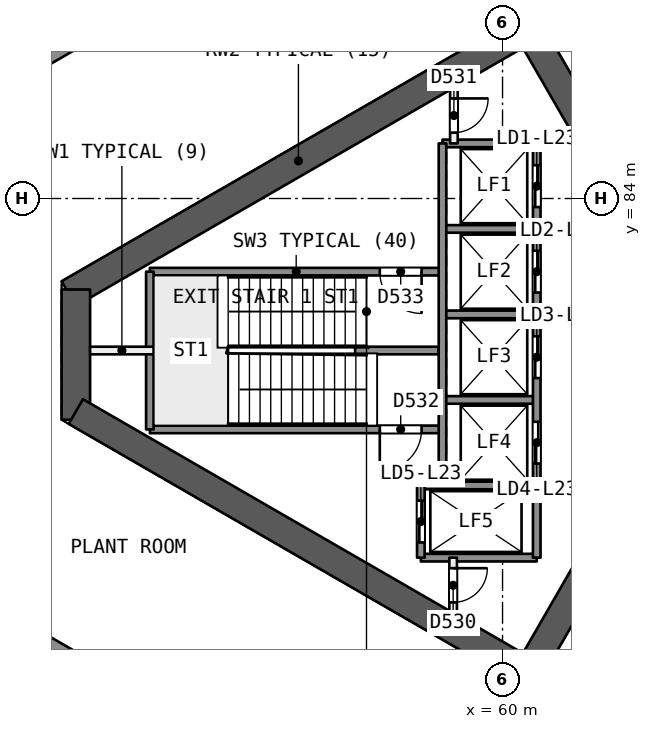
"""IFC4 building model, lengths in metres.
Left out: names, types, materials, properties, quantities, classifications, styles, units other than length and angle.
Written with IfcOpenShell. Run it as: python <this file> out.ifc"""

import sys

from ifc_helpers import new_model, si_unit, direction, frame, frame_2d, origin, place, context, subcontext, project, spatial, rectangle, extrude, element, fill, save


model = new_model("IFC4")
c1 = context("Model", 3, precision=1e-05, world=origin(), true_north=direction((0.0, 1.0)))
c2 = subcontext(c1, "Body", "Model", "MODEL_VIEW")
j1 = project(units=[si_unit("LENGTHUNIT", "METRE"), si_unit("PLANEANGLEUNIT", "RADIAN")], contexts=[c1])
p1 = place(None, origin())
s1 = spatial("IfcSite", under=j1, at=p1, CompositionType="ELEMENT")
p2 = place(p1, origin())
s2 = spatial("IfcBuilding", under=s1, at=p2, CompositionType="ELEMENT")
p3 = place(p2, frame((0.0, 0.0, 98.0)))
s3 = spatial("IfcBuildingStorey", under=s2, at=p3, CompositionType="ELEMENT", Elevation=98.0)
p4 = place(p3, frame((65.567, 80.0, 0.0), z_axis=(0.0, 0.0, 1.0), x_axis=(-0.499988615364, 0.866031976607, 0.0)))
e1 = element("IfcWall", 1, at=p4, inside=s3, PredefinedType="SHEAR", context=c2, shape_type="SweptSolid", body=[
    extrude(rectangle(XDim=10.163, YDim=0.75, at=frame_2d((5.082, 0.0))), origin(), (0.0, 0.0, 1.0), 4.4),
])
p5 = place(p4, frame((0.733, 0.0, 0.0)))
e2 = element("IfcOpeningElement", 2, at=p5, cuts=e1, PredefinedType="OPENING", context=c2, shape_type="SweptSolid", body=[
    extrude(rectangle(XDim=1.2, YDim=2.1, at=frame_2d((0.6, 1.05))), frame((0.0, 0.385, 0.0), z_axis=(0.0, -1.0, 0.0), x_axis=(1.0, 0.0, 0.0)), (0.0, 0.0, 1.0), 0.771),
])
p6 = place(p3, frame((60.673, 88.477, 0.0), z_axis=(0.0, 0.0, 1.0), x_axis=(-0.8660248072, -0.500001033313, 0.0)))
e3 = element("IfcWall", 3, at=p6, inside=s3, PredefinedType="SHEAR", context=c2, shape_type="SweptSolid", body=[
    extrude(rectangle(XDim=13.958, YDim=0.75, at=frame_2d((6.979, 0.0))), origin(), (0.0, 0.0, 1.0), 4.4),
])
p7 = place(p3, frame((48.772, 81.606, 0.0), z_axis=(0.0, 0.0, 1.0), x_axis=(0.0, -1.0, 0.0)))
e4 = element("IfcWall", 4, at=p7, inside=s3, PredefinedType="SHEAR", context=c2, shape_type="SweptSolid", body=[
    extrude(rectangle(XDim=3.429, YDim=0.75, at=frame_2d((1.714, 0.0))), origin(), (0.0, 0.0, 1.0), 4.4),
])
p8 = place(p3, frame((48.772, 78.394, 0.0), z_axis=(0.0, 0.0, 1.0), x_axis=(0.866028339916, -0.499994914436, 0.0)))
e5 = element("IfcWall", 5, at=p8, inside=s3, PredefinedType="SHEAR", context=c2, shape_type="SweptSolid", body=[
    extrude(rectangle(XDim=14.117, YDim=0.75, at=frame_2d((7.059, 0.0))), origin(), (0.0, 0.0, 1.0), 4.4),
])
p9 = place(p3, frame((60.673, 71.523, 0.0), z_axis=(0.0, 0.0, 1.0), x_axis=(0.499997052475, 0.866027105532, 0.0)))
e6 = element("IfcWall", 6, at=p9, inside=s3, PredefinedType="SHEAR", context=c2, shape_type="SweptSolid", body=[
    extrude(rectangle(XDim=10.005, YDim=0.75, at=frame_2d((5.002, 0.0))), origin(), (0.0, 0.0, 1.0), 4.4),
])
p10 = place(p9, frame((7.855, 0.0, 0.0)))
e7 = element("IfcOpeningElement", 7, at=p10, cuts=e6, PredefinedType="OPENING", context=c2, shape_type="SweptSolid", body=[
    extrude(rectangle(XDim=1.2, YDim=2.1, at=frame_2d((0.6, 1.05))), frame((0.0, 0.385, 0.0), z_axis=(0.0, -1.0, 0.0), x_axis=(1.0, 0.0, 0.0)), (0.0, 0.0, 1.0), 0.771),
])
p11 = place(p3, frame((39.875, 82.961, 0.0), z_axis=(0.0, 0.0, 1.0), x_axis=(0.866025498246, 0.499999836387, 0.0)))
e8 = element("IfcWall", 8, at=p11, inside=s3, PredefinedType="SOLIDWALL", context=c2, shape_type="SweptSolid", body=[
    extrude(rectangle(XDim=57.878, YDim=0.3, at=frame_2d((28.939, 0.0))), origin(), (0.0, 0.0, 1.0), 3.9),
])
p12 = place(p11, frame((3.323, 0.0, 0.6)))
e9 = element("IfcOpeningElement", 9, at=p12, cuts=e8, PredefinedType="OPENING", context=c2, shape_type="SweptSolid", body=[
    extrude(rectangle(XDim=3.0, YDim=2.4, at=frame_2d((1.5, 1.2))), frame((0.0, 0.161, 0.0), z_axis=(0.0, -1.0, 0.0), x_axis=(1.0, 0.0, 0.0)), (0.0, 0.0, 1.0), 0.321),
])
p13 = place(p11, frame((12.969, 0.0, 0.6)))
e10 = element("IfcOpeningElement", 10, at=p13, cuts=e8, PredefinedType="OPENING", context=c2, shape_type="SweptSolid", body=[
    extrude(rectangle(XDim=3.0, YDim=2.4, at=frame_2d((1.5, 1.2))), frame((0.0, 0.161, 0.0), z_axis=(0.0, -1.0, 0.0), x_axis=(1.0, 0.0, 0.0)), (0.0, 0.0, 1.0), 0.321),
])
p14 = place(p11, frame((22.616, 0.0, 0.6)))
e11 = element("IfcOpeningElement", 11, at=p14, cuts=e8, PredefinedType="OPENING", context=c2, shape_type="SweptSolid", body=[
    extrude(rectangle(XDim=3.0, YDim=2.4, at=frame_2d((1.5, 1.2))), frame((0.0, 0.161, 0.0), z_axis=(0.0, -1.0, 0.0), x_axis=(1.0, 0.0, 0.0)), (0.0, 0.0, 1.0), 0.321),
])
p15 = place(p11, frame((32.262, 0.0, 0.6)))
e12 = element("IfcOpeningElement", 12, at=p15, cuts=e8, PredefinedType="OPENING", context=c2, shape_type="SweptSolid", body=[
    extrude(rectangle(XDim=3.0, YDim=2.4, at=frame_2d((1.5, 1.2))), frame((0.0, 0.161, 0.0), z_axis=(0.0, -1.0, 0.0), x_axis=(1.0, 0.0, 0.0)), (0.0, 0.0, 1.0), 0.321),
])
p16 = place(p11, frame((41.908, 0.0, 0.6)))
e13 = element("IfcOpeningElement", 13, at=p16, cuts=e8, PredefinedType="OPENING", context=c2, shape_type="SweptSolid", body=[
    extrude(rectangle(XDim=3.0, YDim=2.4, at=frame_2d((1.5, 1.2))), frame((0.0, 0.161, 0.0), z_axis=(0.0, -1.0, 0.0), x_axis=(1.0, 0.0, 0.0)), (0.0, 0.0, 1.0), 0.321),
])
p17 = place(p11, frame((51.555, 0.0, 0.6)))
e14 = element("IfcOpeningElement", 14, at=p17, cuts=e8, PredefinedType="OPENING", context=c2, shape_type="SweptSolid", body=[
    extrude(rectangle(XDim=3.0, YDim=2.4, at=frame_2d((1.5, 1.2))), frame((0.0, 0.161, 0.0), z_axis=(0.0, -1.0, 0.0), x_axis=(1.0, 0.0, 0.0)), (0.0, 0.0, 1.0), 0.321),
])
p18 = place(p3, frame((89.998, 48.1, 0.0), z_axis=(0.0, 0.0, 1.0), x_axis=(-0.866025498246, 0.499999836387, 0.0)))
e15 = element("IfcWall", 15, at=p18, inside=s3, PredefinedType="SOLIDWALL", context=c2, shape_type="SweptSolid", body=[
    extrude(rectangle(XDim=57.878, YDim=0.3, at=frame_2d((28.939, 0.0))), origin(), (0.0, 0.0, 1.0), 3.9),
])
p19 = place(p18, frame((3.323, 0.0, 0.6)))
e16 = element("IfcOpeningElement", 16, at=p19, cuts=e15, PredefinedType="OPENING", context=c2, shape_type="SweptSolid", body=[
    extrude(rectangle(XDim=3.0, YDim=2.4, at=frame_2d((1.5, 1.2))), frame((0.0, 0.161, 0.0), z_axis=(0.0, -1.0, 0.0), x_axis=(1.0, 0.0, 0.0)), (0.0, 0.0, 1.0), 0.321),
])
p20 = place(p18, frame((12.969, 0.0, 0.6)))
e17 = element("IfcOpeningElement", 17, at=p20, cuts=e15, PredefinedType="OPENING", context=c2, shape_type="SweptSolid", body=[
    extrude(rectangle(XDim=3.0, YDim=2.4, at=frame_2d((1.5, 1.2))), frame((0.0, 0.161, 0.0), z_axis=(0.0, -1.0, 0.0), x_axis=(1.0, 0.0, 0.0)), (0.0, 0.0, 1.0), 0.321),
])
p21 = place(p18, frame((22.616, 0.0, 0.6)))
e18 = element("IfcOpeningElement", 18, at=p21, cuts=e15, PredefinedType="OPENING", context=c2, shape_type="SweptSolid", body=[
    extrude(rectangle(XDim=3.0, YDim=2.4, at=frame_2d((1.5, 1.2))), frame((0.0, 0.161, 0.0), z_axis=(0.0, -1.0, 0.0), x_axis=(1.0, 0.0, 0.0)), (0.0, 0.0, 1.0), 0.321),
])
p22 = place(p18, frame((32.262, 0.0, 0.6)))
e19 = element("IfcOpeningElement", 19, at=p22, cuts=e15, PredefinedType="OPENING", context=c2, shape_type="SweptSolid", body=[
    extrude(rectangle(XDim=3.0, YDim=2.4, at=frame_2d((1.5, 1.2))), frame((0.0, 0.161, 0.0), z_axis=(0.0, -1.0, 0.0), x_axis=(1.0, 0.0, 0.0)), (0.0, 0.0, 1.0), 0.321),
])
p23 = place(p18, frame((41.908, 0.0, 0.6)))
e20 = element("IfcOpeningElement", 20, at=p23, cuts=e15, PredefinedType="OPENING", context=c2, shape_type="SweptSolid", body=[
    extrude(rectangle(XDim=3.0, YDim=2.4, at=frame_2d((1.5, 1.2))), frame((0.0, 0.161, 0.0), z_axis=(0.0, -1.0, 0.0), x_axis=(1.0, 0.0, 0.0)), (0.0, 0.0, 1.0), 0.321),
])
p24 = place(p18, frame((51.555, 0.0, 0.6)))
e21 = element("IfcOpeningElement", 21, at=p24, cuts=e15, PredefinedType="OPENING", context=c2, shape_type="SweptSolid", body=[
    extrude(rectangle(XDim=3.0, YDim=2.4, at=frame_2d((1.5, 1.2))), frame((0.0, 0.161, 0.0), z_axis=(0.0, -1.0, 0.0), x_axis=(1.0, 0.0, 0.0)), (0.0, 0.0, 1.0), 0.321),
])
for number, where, z_axis, x_axis in (
    (22, (60.9, 85.45, 0.0), (0.0, 0.0, 1.0), (-1.0, 0.0, 0.0)),
    (23, (60.9, 83.2, 0.0), (0.0, 0.0, 1.0), (-1.0, 0.0, 0.0)),
):
    element("IfcWall", number, at=place(p3, frame(where, z_axis=z_axis, x_axis=x_axis)), inside=s3, PredefinedType="SOLIDWALL", context=c2, shape_type="SweptSolid", body=[
        extrude(rectangle(XDim=2.48, YDim=0.2, at=frame_2d((1.24, 0.0))), origin(), (0.0, 0.0, 1.0), 3.9),
    ])
p25 = place(p3, frame((58.42, 82.075, 0.0), z_axis=(0.0, 0.0, 1.0), x_axis=(-1.0, 0.0, 0.0)))
e24 = element("IfcWall", 24, at=p25, inside=s3, PredefinedType="SOLIDWALL", context=c2, shape_type="SweptSolid", body=[
    extrude(rectangle(XDim=7.7, YDim=0.2, at=frame_2d((3.85, 0.0))), origin(), (0.0, 0.0, 1.0), 3.9),
])
p26 = place(p25, frame((0.55, 0.0, 0.0)))
e25 = element("IfcOpeningElement", 25, at=p26, cuts=e24, PredefinedType="OPENING", context=c2, shape_type="SweptSolid", body=[
    extrude(rectangle(XDim=1.1, YDim=2.1, at=frame_2d((0.55, 1.05))), frame((0.0, 0.11, 0.0), z_axis=(0.0, -1.0, 0.0), x_axis=(1.0, 0.0, 0.0)), (0.0, 0.0, 1.0), 0.221),
])
p27 = place(p3, frame((60.9, 80.95, 0.0), z_axis=(0.0, 0.0, 1.0), x_axis=(-1.0, 0.0, 0.0)))
e26 = element("IfcWall", 26, at=p27, inside=s3, PredefinedType="SOLIDWALL", context=c2, shape_type="SweptSolid", body=[
    extrude(rectangle(XDim=2.48, YDim=0.2, at=frame_2d((1.24, 0.0))), origin(), (0.0, 0.0, 1.0), 3.9),
])
p28 = place(p3, frame((58.32, 80.0, 0.0), z_axis=(0.0, 0.0, 1.0), x_axis=(-1.0, 0.0, 0.0)))
e27 = element("IfcWall", 27, at=p28, inside=s3, PredefinedType="SOLIDWALL", context=c2, shape_type="SweptSolid", body=[
    extrude(rectangle(XDim=2.2, YDim=0.2, at=frame_2d((1.1, 0.0))), origin(), (0.0, 0.0, 1.0), 3.9),
])
p29 = place(p3, frame((50.82, 80.0, 0.0), z_axis=(0.0, 0.0, 1.0), x_axis=(-1.0, 0.0, 0.0)))
e28 = element("IfcWall", 28, at=p29, inside=s3, PredefinedType="PARTITIONING", context=c2, shape_type="SweptSolid", body=[
    extrude(rectangle(XDim=1.673, YDim=0.2, at=frame_2d((0.836, 0.0))), origin(), (0.0, 0.0, 1.0), 3.9),
])
p30 = place(p3, frame((60.9, 78.7, 0.0), z_axis=(0.0, 0.0, 1.0), x_axis=(-1.0, 0.0, 0.0)))
e29 = element("IfcWall", 29, at=p30, inside=s3, PredefinedType="SOLIDWALL", context=c2, shape_type="SweptSolid", body=[
    extrude(rectangle(XDim=2.48, YDim=0.2, at=frame_2d((1.24, 0.0))), origin(), (0.0, 0.0, 1.0), 3.9),
])
p31 = place(p3, frame((58.42, 77.925, 0.0), z_axis=(0.0, 0.0, 1.0), x_axis=(-1.0, 0.0, 0.0)))
e30 = element("IfcWall", 30, at=p31, inside=s3, PredefinedType="SOLIDWALL", context=c2, shape_type="SweptSolid", body=[
    extrude(rectangle(XDim=7.7, YDim=0.2, at=frame_2d((3.85, 0.0))), origin(), (0.0, 0.0, 1.0), 3.9),
])
p32 = place(p31, frame((0.55, 0.0, 0.0)))
e31 = element("IfcOpeningElement", 31, at=p32, cuts=e30, PredefinedType="OPENING", context=c2, shape_type="SweptSolid", body=[
    extrude(rectangle(XDim=1.1, YDim=2.1, at=frame_2d((0.55, 1.05))), frame((0.0, 0.11, 0.0), z_axis=(0.0, -1.0, 0.0), x_axis=(1.0, 0.0, 0.0)), (0.0, 0.0, 1.0), 0.221),
])
for number, where, z_axis, x_axis in (
    (32, (60.9, 76.45, 0.0), (0.0, 0.0, 1.0), (-1.0, 0.0, 0.0)),
    (33, (60.9, 74.55, 0.0), (0.0, 0.0, 1.0), (-1.0, 0.0, 0.0)),
):
    element("IfcWall", number, at=place(p3, frame(where, z_axis=z_axis, x_axis=x_axis)), inside=s3, PredefinedType="SOLIDWALL", context=c2, shape_type="SweptSolid", body=[
        extrude(rectangle(XDim=3.05, YDim=0.2, at=frame_2d((1.525, 0.0))), origin(), (0.0, 0.0, 1.0), 3.9),
    ])
p33 = place(p3, frame((60.9, 85.45, 0.0), z_axis=(0.0, 0.0, 1.0), x_axis=(0.0, -1.0, 0.0)))
e34 = element("IfcWall", 34, at=p33, inside=s3, PredefinedType="SOLIDWALL", context=c2, shape_type="SweptSolid", body=[
    extrude(rectangle(XDim=10.9, YDim=0.2, at=frame_2d((5.45, 0.0))), origin(), (0.0, 0.0, 1.0), 3.9),
])
p34 = place(p33, frame((0.575, 0.0, 0.0)))
e35 = element("IfcOpeningElement", 35, at=p34, cuts=e34, PredefinedType="OPENING", context=c2, shape_type="SweptSolid", body=[
    extrude(rectangle(XDim=1.1, YDim=2.1, at=frame_2d((0.55, 1.05))), frame((0.0, 0.11, 0.0), z_axis=(0.0, -1.0, 0.0), x_axis=(1.0, 0.0, 0.0)), (0.0, 0.0, 1.0), 0.221),
])
p35 = place(p33, frame((2.825, 0.0, 0.0)))
e36 = element("IfcOpeningElement", 36, at=p35, cuts=e34, PredefinedType="OPENING", context=c2, shape_type="SweptSolid", body=[
    extrude(rectangle(XDim=1.1, YDim=2.1, at=frame_2d((0.55, 1.05))), frame((0.0, 0.11, 0.0), z_axis=(0.0, -1.0, 0.0), x_axis=(1.0, 0.0, 0.0)), (0.0, 0.0, 1.0), 0.221),
])
p36 = place(p33, frame((5.075, 0.0, 0.0)))
e37 = element("IfcOpeningElement", 37, at=p36, cuts=e34, PredefinedType="OPENING", context=c2, shape_type="SweptSolid", body=[
    extrude(rectangle(XDim=1.1, YDim=2.1, at=frame_2d((0.55, 1.05))), frame((0.0, 0.11, 0.0), z_axis=(0.0, -1.0, 0.0), x_axis=(1.0, 0.0, 0.0)), (0.0, 0.0, 1.0), 0.221),
])
p37 = place(p33, frame((7.325, 0.0, 0.0)))
e38 = element("IfcOpeningElement", 38, at=p37, cuts=e34, PredefinedType="OPENING", context=c2, shape_type="SweptSolid", body=[
    extrude(rectangle(XDim=1.1, YDim=2.1, at=frame_2d((0.55, 1.05))), frame((0.0, 0.11, 0.0), z_axis=(0.0, -1.0, 0.0), x_axis=(1.0, 0.0, 0.0)), (0.0, 0.0, 1.0), 0.221),
])
p38 = place(p3, frame((58.72, 86.917, 0.0), z_axis=(0.0, 0.0, 1.0), x_axis=(0.0, -1.0, 0.0)))
e39 = element("IfcWall", 39, at=p38, inside=s3, PredefinedType="PARTITIONING", context=c2, shape_type="SweptSolid", body=[
    extrude(rectangle(XDim=1.467, YDim=0.2, at=frame_2d((0.733, 0.0))), origin(), (0.0, 0.0, 1.0), 3.9),
])
p39 = place(p38, frame((0.283, 0.0, 0.0)))
e40 = element("IfcOpeningElement", 40, at=p39, cuts=e39, PredefinedType="OPENING", context=c2, shape_type="SweptSolid", body=[
    extrude(rectangle(XDim=0.9, YDim=2.1, at=frame_2d((0.45, 1.05))), frame((0.0, 0.11, 0.0), z_axis=(0.0, -1.0, 0.0), x_axis=(1.0, 0.0, 0.0)), (0.0, 0.0, 1.0), 0.221),
])
p40 = place(p3, frame((58.7, 74.55, 0.0), z_axis=(0.0, 0.0, 1.0), x_axis=(0.0, -1.0, 0.0)))
e41 = element("IfcWall", 41, at=p40, inside=s3, PredefinedType="PARTITIONING", context=c2, shape_type="SweptSolid", body=[
    extrude(rectangle(XDim=1.455, YDim=0.2, at=frame_2d((0.728, 0.0))), origin(), (0.0, 0.0, 1.0), 3.9),
])
p41 = place(p40, frame((0.278, 0.0, 0.0)))
e42 = element("IfcOpeningElement", 42, at=p41, cuts=e41, PredefinedType="OPENING", context=c2, shape_type="SweptSolid", body=[
    extrude(rectangle(XDim=0.9, YDim=2.1, at=frame_2d((0.45, 1.05))), frame((0.0, 0.11, 0.0), z_axis=(0.0, -1.0, 0.0), x_axis=(1.0, 0.0, 0.0)), (0.0, 0.0, 1.0), 0.221),
])
p42 = place(p3, frame((58.42, 85.45, 0.0), z_axis=(0.0, 0.0, 1.0), x_axis=(0.0, -1.0, 0.0)))
e43 = element("IfcWall", 43, at=p42, inside=s3, PredefinedType="SOLIDWALL", context=c2, shape_type="SweptSolid", body=[
    extrude(rectangle(XDim=9.0, YDim=0.2, at=frame_2d((4.5, 0.0))), origin(), (0.0, 0.0, 1.0), 3.9),
])
p43 = place(p3, frame((57.85, 76.45, 0.0), z_axis=(0.0, 0.0, 1.0), x_axis=(0.0, -1.0, 0.0)))
e44 = element("IfcWall", 44, at=p43, inside=s3, PredefinedType="SOLIDWALL", context=c2, shape_type="SweptSolid", body=[
    extrude(rectangle(XDim=1.9, YDim=0.2, at=frame_2d((0.95, 0.0))), origin(), (0.0, 0.0, 1.0), 3.9),
])
p44 = place(p43, frame((0.4, 0.0, 0.0)))
e45 = element("IfcOpeningElement", 45, at=p44, cuts=e44, PredefinedType="OPENING", context=c2, shape_type="SweptSolid", body=[
    extrude(rectangle(XDim=1.1, YDim=2.1, at=frame_2d((0.55, 1.05))), frame((0.0, 0.11, 0.0), z_axis=(0.0, -1.0, 0.0), x_axis=(1.0, 0.0, 0.0)), (0.0, 0.0, 1.0), 0.221),
])
p45 = place(p3, frame((50.72, 82.075, 0.0), z_axis=(0.0, 0.0, 1.0), x_axis=(0.0, -1.0, 0.0)))
e46 = element("IfcWall", 46, at=p45, inside=s3, PredefinedType="SOLIDWALL", context=c2, shape_type="SweptSolid", body=[
    extrude(rectangle(XDim=4.15, YDim=0.2, at=frame_2d((2.075, 0.0))), origin(), (0.0, 0.0, 1.0), 3.9),
])
p46 = place(p34, origin())
e47 = element("IfcDoor", 47, at=p46, inside=s3, OperationType="SLIDING_TO_RIGHT", PredefinedType="NOTDEFINED", context=c2, shape_type="SweptSolid", body=[
    extrude(rectangle(XDim=1.1, YDim=2.1, at=frame_2d((0.55, 1.05))), frame((0.0, 0.025, 0.0), z_axis=(0.0, -1.0, 0.0), x_axis=(1.0, 0.0, 0.0)), (0.0, 0.0, 1.0), 0.05),
])
fill(e35, e47)
p47 = place(p35, origin())
e48 = element("IfcDoor", 48, at=p47, inside=s3, OperationType="SLIDING_TO_LEFT", PredefinedType="NOTDEFINED", context=c2, shape_type="SweptSolid", body=[
    extrude(rectangle(XDim=1.1, YDim=2.1, at=frame_2d((0.55, 1.05))), frame((0.0, 0.025, 0.0), z_axis=(0.0, -1.0, 0.0), x_axis=(1.0, 0.0, 0.0)), (0.0, 0.0, 1.0), 0.05),
])
fill(e36, e48)
p48 = place(p36, origin())
e49 = element("IfcDoor", 49, at=p48, inside=s3, OperationType="SLIDING_TO_RIGHT", PredefinedType="NOTDEFINED", context=c2, shape_type="SweptSolid", body=[
    extrude(rectangle(XDim=1.1, YDim=2.1, at=frame_2d((0.55, 1.05))), frame((0.0, 0.025, 0.0), z_axis=(0.0, -1.0, 0.0), x_axis=(1.0, 0.0, 0.0)), (0.0, 0.0, 1.0), 0.05),
])
fill(e37, e49)
p49 = place(p37, origin())
e50 = element("IfcDoor", 50, at=p49, inside=s3, OperationType="SLIDING_TO_LEFT", PredefinedType="NOTDEFINED", context=c2, shape_type="SweptSolid", body=[
    extrude(rectangle(XDim=1.1, YDim=2.1, at=frame_2d((0.55, 1.05))), frame((0.0, 0.025, 0.0), z_axis=(0.0, -1.0, 0.0), x_axis=(1.0, 0.0, 0.0)), (0.0, 0.0, 1.0), 0.05),
])
fill(e38, e50)
p50 = place(p44, origin())
e51 = element("IfcDoor", 51, at=p50, inside=s3, OperationType="SLIDING_TO_RIGHT", PredefinedType="NOTDEFINED", context=c2, shape_type="SweptSolid", body=[
    extrude(rectangle(XDim=1.1, YDim=2.1, at=frame_2d((0.55, 1.05))), frame((0.0, 0.025, 0.0), z_axis=(0.0, -1.0, 0.0), x_axis=(1.0, 0.0, 0.0)), (0.0, 0.0, 1.0), 0.05),
])
fill(e45, e51)
p51 = place(p41, origin())
e52 = element("IfcDoor", 52, at=p51, inside=s3, OperationType="SINGLE_SWING_LEFT", PredefinedType="NOTDEFINED", context=c2, shape_type="SweptSolid", body=[
    extrude(rectangle(XDim=0.9, YDim=2.1, at=frame_2d((0.45, 1.05))), frame((0.0, 0.025, 0.0), z_axis=(0.0, -1.0, 0.0), x_axis=(1.0, 0.0, 0.0)), (0.0, 0.0, 1.0), 0.05),
])
fill(e42, e52)
p52 = place(p39, origin())
e53 = element("IfcDoor", 53, at=p52, inside=s3, OperationType="SINGLE_SWING_LEFT", PredefinedType="NOTDEFINED", context=c2, shape_type="SweptSolid", body=[
    extrude(rectangle(XDim=0.9, YDim=2.1, at=frame_2d((0.45, 1.05))), frame((0.0, 0.025, 0.0), z_axis=(0.0, -1.0, 0.0), x_axis=(1.0, 0.0, 0.0)), (0.0, 0.0, 1.0), 0.05),
])
fill(e40, e53)
p53 = place(p32, origin())
e54 = element("IfcDoor", 54, at=p53, inside=s3, OperationType="SINGLE_SWING_RIGHT", PredefinedType="NOTDEFINED", context=c2, shape_type="SweptSolid", body=[
    extrude(rectangle(XDim=1.1, YDim=2.1, at=frame_2d((0.55, 1.05))), frame((0.0, 0.025, 0.0), z_axis=(0.0, -1.0, 0.0), x_axis=(1.0, 0.0, 0.0)), (0.0, 0.0, 1.0), 0.05),
])
fill(e31, e54)
p54 = place(p26, origin())
e55 = element("IfcDoor", 55, at=p54, inside=s3, OperationType="SINGLE_SWING_LEFT", PredefinedType="NOTDEFINED", context=c2, shape_type="SweptSolid", body=[
    extrude(rectangle(XDim=1.1, YDim=2.1, at=frame_2d((0.55, 1.05))), frame((0.0, 0.025, 0.0), z_axis=(0.0, -1.0, 0.0), x_axis=(1.0, 0.0, 0.0)), (0.0, 0.0, 1.0), 0.05),
])
fill(e25, e55)
save(model, sys.argv[1])
